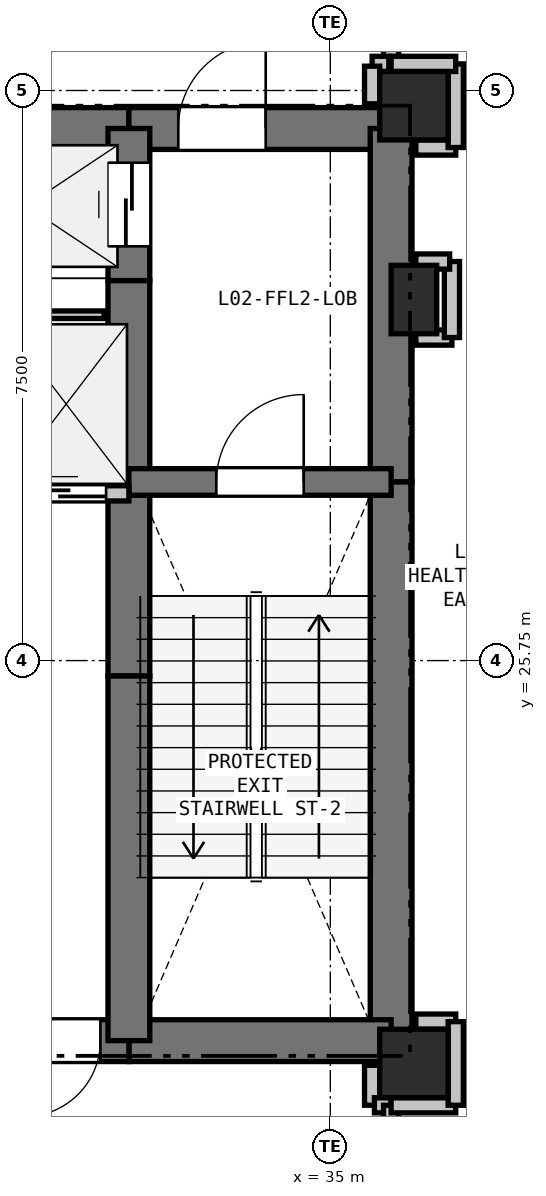
"""IFC4 building model, lengths in metres.
Left out: names, types, materials, properties, quantities, classifications, styles, units other than length and angle.
Written with IfcOpenShell. Run it as: python <this file> out.ifc"""

import sys

from ifc_helpers import new_model, si_unit, direction, frame, frame_2d, origin, origin_2d, place, context, subcontext, project, spatial, rectangle, extrude, element, fill, save


model = new_model("IFC4")
c1 = context("Model", 3, precision=1e-05, world=origin(), true_north=direction((0.0, 1.0)))
c2 = subcontext(c1, "Body", "Model", "MODEL_VIEW")
j1 = project(units=[si_unit("LENGTHUNIT", "METRE"), si_unit("PLANEANGLEUNIT", "RADIAN")], contexts=[c1])
p1 = place(None, origin())
s1 = spatial("IfcSite", under=j1, at=p1, CompositionType="ELEMENT")
p2 = place(p1, origin())
s2 = spatial("IfcBuilding", under=s1, at=p2, CompositionType="ELEMENT")
p3 = place(p2, frame((0.0, 0.0, 9.6)))
s3 = spatial("IfcBuildingStorey", under=s2, at=p3, CompositionType="ELEMENT", Elevation=9.6)
for number, where, z_axis, x_axis in (
    (1, (36.1, 33.05, 0.0), (0.0, 0.0, 1.0), (1.0, 0.0, 0.0)),
    (2, (36.1, 20.45, 0.0), (0.0, 0.0, 1.0), (1.0, 0.0, 0.0)),
):
    element("IfcColumn", number, at=place(p3, frame(where, z_axis=z_axis, x_axis=x_axis)), inside=s3, PredefinedType="COLUMN", context=c2, shape_type="SweptSolid", body=[
        extrude(rectangle(XDim=0.9, YDim=0.9, at=origin_2d()), origin(), (0.0, 0.0, 1.0), 4.8),
    ])
p4 = place(p3, frame((36.1, 30.5, 0.0), z_axis=(0.0, 0.0, 1.0), x_axis=(1.0, 0.0, 0.0)))
e3 = element("IfcColumn", 3, at=p4, inside=s3, PredefinedType="PILASTER", context=c2, shape_type="SweptSolid", body=[
    extrude(rectangle(XDim=0.6, YDim=0.9, at=origin_2d()), origin(), (0.0, 0.0, 1.0), 4.8),
])
p5 = place(p3, frame((29.65, 32.75, 0.0), z_axis=(0.0, 0.0, 1.0), x_axis=(1.0, 0.0, 0.0)))
e4 = element("IfcWall", 4, at=p5, inside=s3, PredefinedType="SHEAR", context=c2, shape_type="SweptSolid", body=[
    extrude(rectangle(XDim=2.7, YDim=0.55, at=frame_2d((1.35, 0.0))), origin(), (0.0, 0.0, 1.0), 4.48),
])
p6 = place(p3, frame((32.35, 32.75, 0.0), z_axis=(0.0, 0.0, 1.0), x_axis=(1.0, 0.0, 0.0)))
e5 = element("IfcWall", 5, at=p6, inside=s3, PredefinedType="SHEAR", context=c2, shape_type="SweptSolid", body=[
    extrude(rectangle(XDim=3.45, YDim=0.55, at=frame_2d((1.725, 0.0))), origin(), (0.0, 0.0, 1.0), 4.48),
])
p7 = place(p6, frame((0.65, 0.0, 0.0)))
e6 = element("IfcOpeningElement", 6, at=p7, cuts=e5, PredefinedType="OPENING", context=c2, shape_type="SweptSolid", body=[
    extrude(rectangle(XDim=1.15, YDim=2.15, at=frame_2d((0.575, 1.075))), frame((0.0, 0.285, 0.0), z_axis=(0.0, -1.0, 0.0), x_axis=(1.0, 0.0, 0.0)), (0.0, 0.0, 1.0), 0.57),
])
p8 = place(p3, frame((35.8, 32.75, 0.0), z_axis=(0.0, 0.0, 1.0), x_axis=(0.0, -1.0, 0.0)))
e7 = element("IfcWall", 7, at=p8, inside=s3, PredefinedType="SHEAR", context=c2, shape_type="SweptSolid", body=[
    extrude(rectangle(XDim=4.65, YDim=0.55, at=frame_2d((2.325, 0.0))), origin(), (0.0, 0.0, 1.0), 4.48),
])
p9 = place(p3, frame((35.8, 28.1, 0.0), z_axis=(0.0, 0.0, 1.0), x_axis=(0.0, -1.0, 0.0)))
e8 = element("IfcWall", 8, at=p9, inside=s3, PredefinedType="SHEAR", context=c2, shape_type="SweptSolid", body=[
    extrude(rectangle(XDim=7.35, YDim=0.55, at=frame_2d((3.675, 0.0))), origin(), (0.0, 0.0, 1.0), 4.48),
])
p10 = place(p3, frame((35.8, 20.75, 0.0), z_axis=(0.0, 0.0, 1.0), x_axis=(-1.0, 0.0, 0.0)))
e9 = element("IfcWall", 9, at=p10, inside=s3, PredefinedType="SHEAR", context=c2, shape_type="SweptSolid", body=[
    extrude(rectangle(XDim=3.45, YDim=0.55, at=frame_2d((1.725, 0.0))), origin(), (0.0, 0.0, 1.0), 4.48),
])
p11 = place(p3, frame((32.35, 20.75, 0.0), z_axis=(0.0, 0.0, 1.0), x_axis=(-1.0, 0.0, 0.0)))
e10 = element("IfcWall", 10, at=p11, inside=s3, PredefinedType="SHEAR", context=c2, shape_type="SweptSolid", body=[
    extrude(rectangle(XDim=1.75, YDim=0.55, at=frame_2d((0.875, 0.0))), origin(), (0.0, 0.0, 1.0), 4.48),
])
p12 = place(p11, frame((0.375, 0.0, 0.0)))
e11 = element("IfcOpeningElement", 11, at=p12, cuts=e10, PredefinedType="OPENING", context=c2, shape_type="SweptSolid", body=[
    extrude(rectangle(XDim=1.0, YDim=2.15, at=frame_2d((0.5, 1.075))), frame((0.0, 0.285, 0.0), z_axis=(0.0, -1.0, 0.0), x_axis=(1.0, 0.0, 0.0)), (0.0, 0.0, 1.0), 0.57),
])
p13 = place(p3, frame((32.35, 20.75, 0.0), z_axis=(0.0, 0.0, 1.0), x_axis=(0.0, 1.0, 0.0)))
e12 = element("IfcWall", 12, at=p13, inside=s3, PredefinedType="SHEAR", context=c2, shape_type="SweptSolid", body=[
    extrude(rectangle(XDim=4.8, YDim=0.55, at=frame_2d((2.4, 0.0))), origin(), (0.0, 0.0, 1.0), 4.48),
])
p14 = place(p3, frame((32.35, 25.55, 0.0), z_axis=(0.0, 0.0, 1.0), x_axis=(0.0, 1.0, 0.0)))
e13 = element("IfcWall", 13, at=p14, inside=s3, PredefinedType="SHEAR", context=c2, shape_type="SweptSolid", body=[
    extrude(rectangle(XDim=2.4, YDim=0.55, at=frame_2d((1.2, 0.0))), origin(), (0.0, 0.0, 1.0), 4.48),
])
p15 = place(p3, frame((32.35, 27.95, 0.0), z_axis=(0.0, 0.0, 1.0), x_axis=(0.0, 1.0, 0.0)))
e14 = element("IfcWall", 14, at=p15, inside=s3, PredefinedType="SHEAR", context=c2, shape_type="SweptSolid", body=[
    extrude(rectangle(XDim=2.8, YDim=0.55, at=frame_2d((1.4, 0.0))), origin(), (0.0, 0.0, 1.0), 4.48),
])
p16 = place(p3, frame((32.35, 30.75, 0.0), z_axis=(0.0, 0.0, 1.0), x_axis=(0.0, 1.0, 0.0)))
e15 = element("IfcWall", 15, at=p16, inside=s3, PredefinedType="SHEAR", context=c2, shape_type="SweptSolid", body=[
    extrude(rectangle(XDim=2.0, YDim=0.55, at=frame_2d((1.0, 0.0))), origin(), (0.0, 0.0, 1.0), 4.48),
])
p17 = place(p16, frame((0.45, 0.0, 0.0)))
e16 = element("IfcOpeningElement", 16, at=p17, cuts=e15, PredefinedType="OPENING", context=c2, shape_type="SweptSolid", body=[
    extrude(rectangle(XDim=1.1, YDim=2.15, at=frame_2d((0.55, 1.075))), frame((0.0, 0.285, 0.0), z_axis=(0.0, -1.0, 0.0), x_axis=(1.0, 0.0, 0.0)), (0.0, 0.0, 1.0), 0.57),
])
p18 = place(p3, frame((32.35, 28.1, 0.0), z_axis=(0.0, 0.0, 1.0), x_axis=(1.0, 0.0, 0.0)))
e17 = element("IfcWall", 17, at=p18, inside=s3, PredefinedType="SHEAR", context=c2, shape_type="SweptSolid", body=[
    extrude(rectangle(XDim=3.45, YDim=0.35, at=frame_2d((1.725, 0.0))), origin(), (0.0, 0.0, 1.0), 4.48),
])
p19 = place(p18, frame((1.15, 0.0, 0.0)))
e18 = element("IfcOpeningElement", 18, at=p19, cuts=e17, PredefinedType="OPENING", context=c2, shape_type="SweptSolid", body=[
    extrude(rectangle(XDim=1.15, YDim=2.15, at=frame_2d((0.575, 1.075))), frame((0.0, 0.185, 0.0), z_axis=(0.0, -1.0, 0.0), x_axis=(1.0, 0.0, 0.0)), (0.0, 0.0, 1.0), 0.37),
])
p20 = place(p3, frame((27.4, 27.95, 0.0), z_axis=(0.0, 0.0, 1.0), x_axis=(1.0, 0.0, 0.0)))
e19 = element("IfcWall", 19, at=p20, inside=s3, PredefinedType="PARTITIONING", context=c2, shape_type="SweptSolid", body=[
    extrude(rectangle(XDim=4.95, YDim=0.2, at=frame_2d((2.475, 0.0))), origin(), (0.0, 0.0, 1.0), 4.48),
])
p21 = place(p20, frame((0.25, 0.0, 0.0)))
e20 = element("IfcOpeningElement", 20, at=p21, cuts=e19, PredefinedType="OPENING", context=c2, shape_type="SweptSolid", body=[
    extrude(rectangle(XDim=1.1, YDim=2.15, at=frame_2d((0.55, 1.075))), frame((0.0, 0.11, 0.0), z_axis=(0.0, -1.0, 0.0), x_axis=(1.0, 0.0, 0.0)), (0.0, 0.0, 1.0), 0.22),
])
p22 = place(p20, frame((1.9, 0.0, 0.0)))
e21 = element("IfcOpeningElement", 21, at=p22, cuts=e19, PredefinedType="OPENING", context=c2, shape_type="SweptSolid", body=[
    extrude(rectangle(XDim=1.1, YDim=2.15, at=frame_2d((0.55, 1.075))), frame((0.0, 0.11, 0.0), z_axis=(0.0, -1.0, 0.0), x_axis=(1.0, 0.0, 0.0)), (0.0, 0.0, 1.0), 0.22),
])
p23 = place(p20, frame((3.55, 0.0, 0.0)))
e22 = element("IfcOpeningElement", 22, at=p23, cuts=e19, PredefinedType="OPENING", context=c2, shape_type="SweptSolid", body=[
    extrude(rectangle(XDim=1.1, YDim=2.15, at=frame_2d((0.55, 1.075))), frame((0.0, 0.11, 0.0), z_axis=(0.0, -1.0, 0.0), x_axis=(1.0, 0.0, 0.0)), (0.0, 0.0, 1.0), 0.22),
])
p24 = place(p3, frame((32.025, 30.3, 0.0), z_axis=(0.0, 0.0, 1.0), x_axis=(-1.0, 0.0, 0.0)))
e23 = element("IfcWall", 23, at=p24, inside=s3, PredefinedType="PARTITIONING", context=c2, shape_type="SweptSolid", body=[
    extrude(rectangle(XDim=1.325, YDim=0.1, at=frame_2d((0.663, 0.0))), origin(), (0.0, 0.0, 1.0), 4.48),
])
p25 = place(p3, frame((35.55, 20.425, 0.0), z_axis=(0.0, 0.0, 1.0), x_axis=(0.0, -1.0, 0.0)))
e24 = element("IfcWall", 24, at=p25, inside=s3, PredefinedType="PARTITIONING", context=c2, shape_type="SweptSolid", body=[
    extrude(rectangle(XDim=0.525, YDim=0.2, at=frame_2d((0.263, 0.0))), origin(), (0.0, 0.0, 1.0), 3.928),
])
p26 = place(p3, frame((35.58, 19.9, 0.0), z_axis=(0.0, 0.0, 1.0), x_axis=(1.0, 0.0, 0.0)))
e25 = element("IfcWall", 25, at=p26, inside=s3, PredefinedType="PARTITIONING", context=c2, shape_type="SweptSolid", body=[
    extrude(rectangle(XDim=0.22, YDim=0.2, at=frame_2d((0.11, 0.0))), origin(), (0.0, 0.0, 1.0), 4.48),
])
p27 = place(p3, frame((35.8, 19.9, 0.0), z_axis=(0.0, 0.0, 1.0), x_axis=(0.0, -1.0, 0.0)))
e26 = element("IfcWall", 26, at=p27, inside=s3, PredefinedType="PARTITIONING", context=c2, shape_type="SweptSolid", body=[
    extrude(rectangle(XDim=2.45, YDim=0.2, at=frame_2d((1.225, 0.0))), origin(), (0.0, 0.0, 1.0), 4.48),
])
p28 = place(p27, frame((0.725, 0.0, 0.0)))
e27 = element("IfcOpeningElement", 27, at=p28, cuts=e26, PredefinedType="OPENING", context=c2, shape_type="SweptSolid", body=[
    extrude(rectangle(XDim=1.0, YDim=2.15, at=frame_2d((0.5, 1.075))), frame((0.0, 0.11, 0.0), z_axis=(0.0, -1.0, 0.0), x_axis=(1.0, 0.0, 0.0)), (0.0, 0.0, 1.0), 0.22),
])
p29 = place(p3, frame((35.8, 36.05, 0.0), z_axis=(0.0, 0.0, 1.0), x_axis=(0.0, -1.0, 0.0)))
e28 = element("IfcWall", 28, at=p29, inside=s3, PredefinedType="PARTITIONING", context=c2, shape_type="SweptSolid", body=[
    extrude(rectangle(XDim=2.45, YDim=0.2, at=frame_2d((1.225, 0.0))), origin(), (0.0, 0.0, 1.0), 4.48),
])
p30 = place(p29, frame((0.725, 0.0, 0.0)))
e29 = element("IfcOpeningElement", 29, at=p30, cuts=e28, PredefinedType="OPENING", context=c2, shape_type="SweptSolid", body=[
    extrude(rectangle(XDim=1.0, YDim=2.15, at=frame_2d((0.5, 1.075))), frame((0.0, 0.11, 0.0), z_axis=(0.0, -1.0, 0.0), x_axis=(1.0, 0.0, 0.0)), (0.0, 0.0, 1.0), 0.22),
])
p31 = place(p3, frame((35.77, 33.6, 0.0), z_axis=(0.0, 0.0, 1.0), x_axis=(-1.0, 0.0, 0.0)))
e30 = element("IfcWall", 30, at=p31, inside=s3, PredefinedType="PARTITIONING", context=c2, shape_type="SweptSolid", body=[
    extrude(rectangle(XDim=0.22, YDim=0.2, at=frame_2d((0.11, 0.0))), origin(), (0.0, 0.0, 1.0), 4.48),
])
p32 = place(p3, frame((35.55, 33.57, 0.0), z_axis=(0.0, 0.0, 1.0), x_axis=(0.0, -1.0, 0.0)))
e31 = element("IfcWall", 31, at=p32, inside=s3, PredefinedType="PARTITIONING", context=c2, shape_type="SweptSolid", body=[
    extrude(rectangle(XDim=0.495, YDim=0.2, at=frame_2d((0.248, 0.0))), origin(), (0.0, 0.0, 1.0), 3.928),
])
p33 = place(p3, frame((36.65, 21.0, 0.0), z_axis=(0.0, 0.0, 1.0), x_axis=(-1.0, 0.0, 0.0)))
e32 = element("IfcWall", 32, at=p33, inside=s3, PredefinedType="PARTITIONING", context=c2, shape_type="SweptSolid", body=[
    extrude(rectangle(XDim=0.525, YDim=0.2, at=frame_2d((0.262, 0.0))), origin(), (0.0, 0.0, 1.0), 3.928),
])
p34 = place(p3, frame((36.125, 30.0, 0.0), z_axis=(0.0, 0.0, 1.0), x_axis=(1.0, 0.0, 0.0)))
e33 = element("IfcWall", 33, at=p34, inside=s3, PredefinedType="PARTITIONING", context=c2, shape_type="SweptSolid", body=[
    extrude(rectangle(XDim=0.475, YDim=0.2, at=frame_2d((0.238, 0.0))), origin(), (0.0, 0.0, 1.0), 3.928),
])
p35 = place(p3, frame((36.6, 30.0, 0.0), z_axis=(0.0, 0.0, 1.0), x_axis=(0.0, 1.0, 0.0)))
e34 = element("IfcWall", 34, at=p35, inside=s3, PredefinedType="PARTITIONING", context=c2, shape_type="SweptSolid", body=[
    extrude(rectangle(XDim=1.0, YDim=0.2, at=frame_2d((0.5, 0.0))), origin(), (0.0, 0.0, 1.0), 4.48),
])
p36 = place(p3, frame((36.57, 31.0, 0.0), z_axis=(0.0, 0.0, 1.0), x_axis=(-1.0, 0.0, 0.0)))
e35 = element("IfcWall", 35, at=p36, inside=s3, PredefinedType="PARTITIONING", context=c2, shape_type="SweptSolid", body=[
    extrude(rectangle(XDim=0.445, YDim=0.2, at=frame_2d((0.223, 0.0))), origin(), (0.0, 0.0, 1.0), 3.928),
])
p37 = place(p3, frame((36.125, 32.5, 0.0), z_axis=(0.0, 0.0, 1.0), x_axis=(1.0, 0.0, 0.0)))
e36 = element("IfcWall", 36, at=p37, inside=s3, PredefinedType="PARTITIONING", context=c2, shape_type="SweptSolid", body=[
    extrude(rectangle(XDim=0.525, YDim=0.2, at=frame_2d((0.262, 0.0))), origin(), (0.0, 0.0, 1.0), 3.928),
])
p38 = place(p3, frame((36.65, 32.5, 0.0), z_axis=(0.0, 0.0, 1.0), x_axis=(0.0, 1.0, 0.0)))
e37 = element("IfcWall", 37, at=p38, inside=s3, PredefinedType="PARTITIONING", context=c2, shape_type="SweptSolid", body=[
    extrude(rectangle(XDim=1.1, YDim=0.2, at=frame_2d((0.55, 0.0))), origin(), (0.0, 0.0, 1.0), 3.777),
])
for number, where, z_axis, x_axis in (
    (38, (36.65, 33.6, 0.0), (0.0, 0.0, 1.0), (-1.0, 0.0, 0.0)),
    (39, (35.8, 19.9, 0.0), (0.0, 0.0, 1.0), (1.0, 0.0, 0.0)),
):
    element("IfcWall", number, at=place(p3, frame(where, z_axis=z_axis, x_axis=x_axis)), inside=s3, PredefinedType="PARTITIONING", context=c2, shape_type="SweptSolid", body=[
        extrude(rectangle(XDim=0.85, YDim=0.2, at=frame_2d((0.425, 0.0))), origin(), (0.0, 0.0, 1.0), 3.777),
    ])
p39 = place(p3, frame((36.65, 19.9, 0.0), z_axis=(0.0, 0.0, 1.0), x_axis=(0.0, 1.0, 0.0)))
e40 = element("IfcWall", 40, at=p39, inside=s3, PredefinedType="PARTITIONING", context=c2, shape_type="SweptSolid", body=[
    extrude(rectangle(XDim=1.1, YDim=0.2, at=frame_2d((0.55, 0.0))), origin(), (0.0, 0.0, 1.0), 4.48),
])
p40 = place(p23, origin())
e41 = element("IfcDoor", 41, at=p40, inside=s3, OperationType="SLIDING_TO_LEFT", PredefinedType="DOOR", context=c2, shape_type="SweptSolid", body=[
    extrude(rectangle(XDim=1.1, YDim=2.15, at=frame_2d((0.55, 1.075))), frame((0.0, 0.025, 0.0), z_axis=(0.0, -1.0, 0.0), x_axis=(1.0, 0.0, 0.0)), (0.0, 0.0, 1.0), 0.05),
])
fill(e22, e41)
p41 = place(p12, origin())
e42 = element("IfcDoor", 42, at=p41, inside=s3, OperationType="SINGLE_SWING_RIGHT", PredefinedType="DOOR", context=c2, shape_type="SweptSolid", body=[
    extrude(rectangle(XDim=1.0, YDim=2.15, at=frame_2d((0.5, 1.075))), frame((0.0, 0.025, 0.0), z_axis=(0.0, -1.0, 0.0), x_axis=(1.0, 0.0, 0.0)), (0.0, 0.0, 1.0), 0.05),
])
fill(e11, e42)
p42 = place(p17, origin())
e43 = element("IfcDoor", 43, at=p42, inside=s3, OperationType="SLIDING_TO_LEFT", PredefinedType="DOOR", context=c2, shape_type="SweptSolid", body=[
    extrude(rectangle(XDim=1.1, YDim=2.15, at=frame_2d((0.55, 1.075))), frame((0.0, 0.025, 0.0), z_axis=(0.0, -1.0, 0.0), x_axis=(1.0, 0.0, 0.0)), (0.0, 0.0, 1.0), 0.05),
])
fill(e16, e43)
p43 = place(p19, origin())
e44 = element("IfcDoor", 44, at=p43, inside=s3, OperationType="SINGLE_SWING_RIGHT", PredefinedType="DOOR", context=c2, shape_type="SweptSolid", body=[
    extrude(rectangle(XDim=1.15, YDim=2.15, at=frame_2d((0.575, 1.075))), frame((0.0, 0.025, 0.0), z_axis=(0.0, -1.0, 0.0), x_axis=(1.0, 0.0, 0.0)), (0.0, 0.0, 1.0), 0.05),
])
fill(e18, e44)
p44 = place(p7, origin())
e45 = element("IfcDoor", 45, at=p44, inside=s3, OperationType="SINGLE_SWING_RIGHT", PredefinedType="DOOR", context=c2, shape_type="SweptSolid", body=[
    extrude(rectangle(XDim=1.15, YDim=2.15, at=frame_2d((0.575, 1.075))), frame((0.0, 0.025, 0.0), z_axis=(0.0, -1.0, 0.0), x_axis=(1.0, 0.0, 0.0)), (0.0, 0.0, 1.0), 0.05),
])
fill(e6, e45)
save(model, sys.argv[1])
